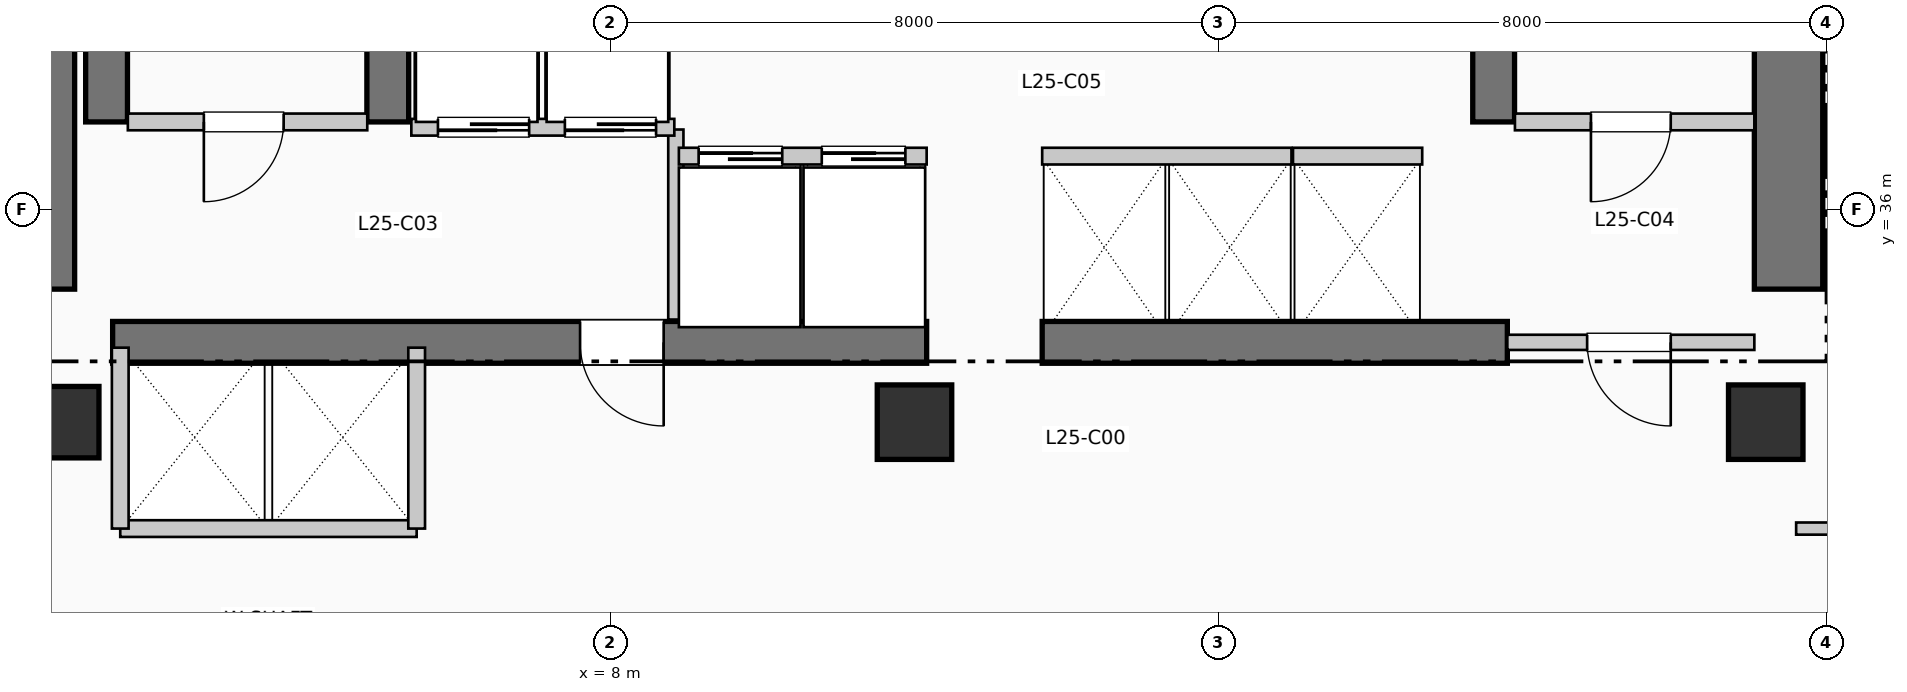
"""IFC4 building model, lengths in metres.
Left out: names, types, materials, properties, quantities, classifications, styles, units other than length and angle.
Written with IfcOpenShell. Run it as: python <this file> out.ifc"""

import sys

from ifc_helpers import new_model, si_unit, direction, frame, frame_2d, origin, origin_2d, place, context, subcontext, project, spatial, rectangle, extrude, element, fill, save


model = new_model("IFC4")
c1 = context("Model", 3, precision=1e-05, world=origin(), true_north=direction((0.0, 1.0)))
c2 = subcontext(c1, "Body", "Model", "MODEL_VIEW")
j1 = project(units=[si_unit("LENGTHUNIT", "METRE"), si_unit("PLANEANGLEUNIT", "RADIAN")], contexts=[c1])
p1 = place(None, origin())
s1 = spatial("IfcSite", under=j1, at=p1, CompositionType="ELEMENT")
p2 = place(p1, origin())
s2 = spatial("IfcBuilding", under=s1, at=p2, CompositionType="ELEMENT")
p3 = place(p2, frame((0.0, 0.0, 106.59)))
s3 = spatial("IfcBuildingStorey", under=s2, at=p3, CompositionType="ELEMENT", Elevation=106.59)
p4 = place(p3, frame((0.5, 34.95, 0.0), z_axis=(0.0, 0.0, 1.0), x_axis=(0.0, 1.0, 0.0)))
e1 = element("IfcWall", 1, at=p4, inside=s3, PredefinedType="SHEAR", context=c2, shape_type="SweptSolid", body=[
    extrude(rectangle(XDim=7.9, YDim=0.9, at=frame_2d((3.95, 0.0))), origin(), (0.0, 0.0, 1.0), 3.96),
])
p5 = place(p3, frame((23.5, 34.95, 0.0), z_axis=(0.0, 0.0, 1.0), x_axis=(0.0, 1.0, 0.0)))
e2 = element("IfcWall", 2, at=p5, inside=s3, PredefinedType="SHEAR", context=c2, shape_type="SweptSolid", body=[
    extrude(rectangle(XDim=10.64, YDim=0.9, at=frame_2d((5.32, 0.0))), origin(), (0.0, 0.0, 1.0), 3.96),
])
p6 = place(p3, frame((1.45, 34.25, 0.0), z_axis=(0.0, 0.0, 1.0), x_axis=(1.0, 0.0, 0.0)))
e3 = element("IfcWall", 3, at=p6, inside=s3, PredefinedType="SHEAR", context=c2, shape_type="SweptSolid", body=[
    extrude(rectangle(XDim=10.71, YDim=0.55, at=frame_2d((5.355, 0.0))), origin(), (0.0, 0.0, 1.0), 3.96),
])
p7 = place(p6, frame((7.25, 0.0, 0.0), z_axis=(0.0, 0.0, 1.0), x_axis=(-1.0, 0.0, 0.0)))
e4 = element("IfcOpeningElement", 4, at=p7, cuts=e3, PredefinedType="OPENING", context=c2, shape_type="SweptSolid", body=[
    extrude(rectangle(XDim=1.1, YDim=2.15, at=frame_2d((0.55, 1.075))), frame((0.0, 0.285, 0.0), z_axis=(0.0, -1.0, 0.0), x_axis=(1.0, 0.0, 0.0)), (0.0, 0.0, 1.0), 0.57),
])
p8 = place(p3, frame((13.68, 34.25, 0.0), z_axis=(0.0, 0.0, 1.0), x_axis=(1.0, 0.0, 0.0)))
e5 = element("IfcWall", 5, at=p8, inside=s3, PredefinedType="SHEAR", context=c2, shape_type="SweptSolid", body=[
    extrude(rectangle(XDim=6.12, YDim=0.55, at=frame_2d((3.06, 0.0))), origin(), (0.0, 0.0, 1.0), 3.96),
])
for number, where, z_axis, x_axis in (
    (6, (1.37, 37.15, 0.0), (0.0, 0.0, 1.0), (0.0, 1.0, 0.0)),
    (7, (5.07, 37.15, 0.0), (0.0, 0.0, 1.0), (0.0, 1.0, 0.0)),
    (8, (19.62, 37.15, 0.0), (0.0, 0.0, 1.0), (0.0, 1.0, 0.0)),
):
    element("IfcWall", number, at=place(p3, frame(where, z_axis=z_axis, x_axis=x_axis)), inside=s3, PredefinedType="SHEAR", context=c2, shape_type="SweptSolid", body=[
        extrude(rectangle(XDim=7.89, YDim=0.55, at=frame_2d((3.945, 0.0))), origin(), (0.0, 0.0, 1.0), 3.96),
    ])
p9 = place(p3, frame((0.8, 33.2, 0.0), z_axis=(0.0, 0.0, 1.0), x_axis=(1.0, 0.0, 0.0)))
e9 = element("IfcColumn", 9, at=p9, inside=s3, PredefinedType="COLUMN", context=c2, shape_type="SweptSolid", body=[
    extrude(rectangle(XDim=0.94, YDim=0.94, at=origin_2d()), origin(), (0.0, 0.0, 1.0), 3.96),
])
for number, where, z_axis, x_axis in (
    (10, (12.0, 33.2, 0.0), (0.0, 0.0, 1.0), (1.0, 0.0, 0.0)),
    (11, (23.2, 33.2, 0.0), (0.0, 0.0, 1.0), (1.0, 0.0, 0.0)),
):
    element("IfcColumn", number, at=place(p3, frame(where, z_axis=z_axis, x_axis=x_axis)), inside=s3, PredefinedType="COLUMN", context=c2, shape_type="SweptSolid", body=[
        extrude(rectangle(XDim=0.98, YDim=0.98, at=origin_2d()), origin(), (0.0, 0.0, 1.0), 3.96),
    ])
p10 = place(p3, frame((1.65, 37.15, 0.0), z_axis=(0.0, 0.0, 1.0), x_axis=(1.0, 0.0, 0.0)))
e12 = element("IfcWall", 12, at=p10, inside=s3, PredefinedType="PARTITIONING", context=c2, shape_type="SweptSolid", body=[
    extrude(rectangle(XDim=3.15, YDim=0.22, at=frame_2d((1.575, 0.0))), origin(), (0.0, 0.0, 1.0), 3.71),
])
p11 = place(p10, frame((2.05, 0.0, 0.0), z_axis=(0.0, 0.0, 1.0), x_axis=(-1.0, 0.0, 0.0)))
e13 = element("IfcOpeningElement", 13, at=p11, cuts=e12, PredefinedType="OPENING", context=c2, shape_type="SweptSolid", body=[
    extrude(rectangle(XDim=1.05, YDim=2.15, at=frame_2d((0.525, 1.075))), frame((0.0, 0.12, 0.0), z_axis=(0.0, -1.0, 0.0), x_axis=(1.0, 0.0, 0.0)), (0.0, 0.0, 1.0), 0.24),
])
p12 = place(p3, frame((8.86, 34.55, 0.0), z_axis=(0.0, 0.0, 1.0), x_axis=(0.0, 1.0, 0.0)))
e14 = element("IfcWall", 14, at=p12, inside=s3, PredefinedType="PARTITIONING", context=c2, shape_type="SweptSolid", body=[
    extrude(rectangle(XDim=2.5, YDim=0.2, at=frame_2d((1.25, 0.0))), origin(), (0.0, 0.0, 1.0), 3.71),
])
p13 = place(p3, frame((19.9, 37.15, 0.0), z_axis=(0.0, 0.0, 1.0), x_axis=(1.0, 0.0, 0.0)))
e15 = element("IfcWall", 15, at=p13, inside=s3, PredefinedType="PARTITIONING", context=c2, shape_type="SweptSolid", body=[
    extrude(rectangle(XDim=3.15, YDim=0.22, at=frame_2d((1.575, 0.0))), origin(), (0.0, 0.0, 1.0), 3.71),
])
p14 = place(p13, frame((2.05, 0.0, 0.0), z_axis=(0.0, 0.0, 1.0), x_axis=(-1.0, 0.0, 0.0)))
e16 = element("IfcOpeningElement", 16, at=p14, cuts=e15, PredefinedType="OPENING", context=c2, shape_type="SweptSolid", body=[
    extrude(rectangle(XDim=1.05, YDim=2.15, at=frame_2d((0.525, 1.075))), frame((0.0, 0.12, 0.0), z_axis=(0.0, -1.0, 0.0), x_axis=(1.0, 0.0, 0.0)), (0.0, 0.0, 1.0), 0.24),
])
p15 = place(p3, frame((19.8, 34.25, 0.0), z_axis=(0.0, 0.0, 1.0), x_axis=(1.0, 0.0, 0.0)))
e17 = element("IfcWall", 17, at=p15, inside=s3, PredefinedType="PARTITIONING", context=c2, shape_type="SweptSolid", body=[
    extrude(rectangle(XDim=3.25, YDim=0.2, at=frame_2d((1.625, 0.0))), origin(), (0.0, 0.0, 1.0), 3.71),
])
p16 = place(p15, frame((2.15, 0.0, 0.0), z_axis=(0.0, 0.0, 1.0), x_axis=(-1.0, 0.0, 0.0)))
e18 = element("IfcOpeningElement", 18, at=p16, cuts=e17, PredefinedType="OPENING", context=c2, shape_type="SweptSolid", body=[
    extrude(rectangle(XDim=1.1, YDim=2.15, at=frame_2d((0.55, 1.075))), frame((0.0, 0.11, 0.0), z_axis=(0.0, -1.0, 0.0), x_axis=(1.0, 0.0, 0.0)), (0.0, 0.0, 1.0), 0.22),
])
p17 = place(p3, frame((5.38, 37.08, 0.0), z_axis=(0.0, 0.0, 1.0), x_axis=(1.0, 0.0, 0.0)))
e19 = element("IfcWall", 19, at=p17, inside=s3, PredefinedType="PARTITIONING", context=c2, shape_type="SweptSolid", body=[
    extrude(rectangle(XDim=3.46, YDim=0.22, at=frame_2d((1.73, 0.0))), origin(), (0.0, 0.0, 1.0), 3.71),
])
p18 = place(p17, frame((1.55, 0.0, 0.0), z_axis=(0.0, 0.0, 1.0), x_axis=(-1.0, 0.0, 0.0)))
e20 = element("IfcOpeningElement", 20, at=p18, cuts=e19, PredefinedType="OPENING", context=c2, shape_type="SweptSolid", body=[
    extrude(rectangle(XDim=1.2, YDim=2.2, at=frame_2d((0.6, 1.1))), frame((0.0, 0.12, 0.0), z_axis=(0.0, -1.0, 0.0), x_axis=(1.0, 0.0, 0.0)), (0.0, 0.0, 1.0), 0.24),
])
p19 = place(p17, frame((3.22, 0.0, 0.0), z_axis=(0.0, 0.0, 1.0), x_axis=(-1.0, 0.0, 0.0)))
e21 = element("IfcOpeningElement", 21, at=p19, cuts=e19, PredefinedType="OPENING", context=c2, shape_type="SweptSolid", body=[
    extrude(rectangle(XDim=1.2, YDim=2.2, at=frame_2d((0.6, 1.1))), frame((0.0, 0.12, 0.0), z_axis=(0.0, -1.0, 0.0), x_axis=(1.0, 0.0, 0.0)), (0.0, 0.0, 1.0), 0.24),
])
p20 = place(p3, frame((1.55, 31.8, 0.0), z_axis=(0.0, 0.0, 1.0), x_axis=(1.0, 0.0, 0.0)))
e22 = element("IfcWall", 22, at=p20, inside=s3, PredefinedType="PARTITIONING", context=c2, shape_type="SweptSolid", body=[
    extrude(rectangle(XDim=3.9, YDim=0.22, at=frame_2d((1.95, 0.0))), origin(), (0.0, 0.0, 1.0), 3.71),
])
for number, where, z_axis, x_axis in (
    (23, (1.55, 31.8, 0.0), (0.0, 0.0, 1.0), (0.0, 1.0, 0.0)),
    (24, (5.45, 31.8, 0.0), (0.0, 0.0, 1.0), (0.0, 1.0, 0.0)),
):
    element("IfcWall", number, at=place(p3, frame(where, z_axis=z_axis, x_axis=x_axis)), inside=s3, PredefinedType="PARTITIONING", context=c2, shape_type="SweptSolid", body=[
        extrude(rectangle(XDim=2.38, YDim=0.22, at=frame_2d((1.19, 0.0))), origin(), (0.0, 0.0, 1.0), 3.71),
    ])
p21 = place(p3, frame((8.9, 36.7, 0.0), z_axis=(0.0, 0.0, 1.0), x_axis=(1.0, 0.0, 0.0)))
e25 = element("IfcWall", 25, at=p21, inside=s3, PredefinedType="PARTITIONING", context=c2, shape_type="SweptSolid", body=[
    extrude(rectangle(XDim=3.26, YDim=0.22, at=frame_2d((1.63, 0.0))), origin(), (0.0, 0.0, 1.0), 3.71),
])
p22 = place(p21, frame((0.26, 0.0, 0.0)))
e26 = element("IfcOpeningElement", 26, at=p22, cuts=e25, PredefinedType="OPENING", context=c2, shape_type="SweptSolid", body=[
    extrude(rectangle(XDim=1.1, YDim=2.2, at=frame_2d((0.55, 1.1))), frame((0.0, 0.12, 0.0), z_axis=(0.0, -1.0, 0.0), x_axis=(1.0, 0.0, 0.0)), (0.0, 0.0, 1.0), 0.24),
])
p23 = place(p21, frame((1.88, 0.0, 0.0)))
e27 = element("IfcOpeningElement", 27, at=p23, cuts=e25, PredefinedType="OPENING", context=c2, shape_type="SweptSolid", body=[
    extrude(rectangle(XDim=1.1, YDim=2.2, at=frame_2d((0.55, 1.1))), frame((0.0, 0.12, 0.0), z_axis=(0.0, -1.0, 0.0), x_axis=(1.0, 0.0, 0.0)), (0.0, 0.0, 1.0), 0.24),
])
p24 = place(p3, frame((13.68, 36.7, 0.0), z_axis=(0.0, 0.0, 1.0), x_axis=(1.0, 0.0, 0.0)))
e28 = element("IfcWall", 28, at=p24, inside=s3, PredefinedType="PARTITIONING", context=c2, shape_type="SweptSolid", body=[
    extrude(rectangle(XDim=3.28, YDim=0.22, at=frame_2d((1.64, 0.0))), origin(), (0.0, 0.0, 1.0), 3.71),
])
p25 = place(p3, frame((16.98, 36.7, 0.0), z_axis=(0.0, 0.0, 1.0), x_axis=(1.0, 0.0, 0.0)))
e29 = element("IfcWall", 29, at=p25, inside=s3, PredefinedType="PARTITIONING", context=c2, shape_type="SweptSolid", body=[
    extrude(rectangle(XDim=1.7, YDim=0.22, at=frame_2d((0.85, 0.0))), origin(), (0.0, 0.0, 1.0), 3.71),
])
p26 = place(p3, frame((23.6, 31.8, 0.0), z_axis=(0.0, 0.0, 1.0), x_axis=(1.0, 0.0, 0.0)))
e30 = element("IfcWall", 30, at=p26, inside=s3, PredefinedType="PARTITIONING", context=c2, shape_type="SweptSolid", body=[
    extrude(rectangle(XDim=32.21, YDim=0.16, at=frame_2d((16.105, 0.0))), origin(), (0.0, 0.0, 1.0), 3.71),
])
p27 = place(p26, frame((8.255, 0.0, 0.0)))
e31 = element("IfcOpeningElement", 31, at=p27, cuts=e30, PredefinedType="OPENING", context=c2, shape_type="SweptSolid", body=[
    extrude(rectangle(XDim=0.95, YDim=2.15, at=frame_2d((0.475, 1.075))), frame((0.0, 0.09, 0.0), z_axis=(0.0, -1.0, 0.0), x_axis=(1.0, 0.0, 0.0)), (0.0, 0.0, 1.0), 0.18),
])
p28 = place(p26, frame((23.36, 0.0, 0.0)))
e32 = element("IfcOpeningElement", 32, at=p28, cuts=e30, PredefinedType="OPENING", context=c2, shape_type="SweptSolid", body=[
    extrude(rectangle(XDim=0.95, YDim=2.15, at=frame_2d((0.475, 1.075))), frame((0.0, 0.09, 0.0), z_axis=(0.0, -1.0, 0.0), x_axis=(1.0, 0.0, 0.0)), (0.0, 0.0, 1.0), 0.18),
])
p29 = place(p11, origin())
e33 = element("IfcDoor", 33, at=p29, inside=s3, OperationType="SINGLE_SWING_LEFT", PredefinedType="DOOR", context=c2, shape_type="SweptSolid", body=[
    extrude(rectangle(XDim=1.05, YDim=2.15, at=frame_2d((0.525, 1.075))), frame((0.0, 0.025, 0.0), z_axis=(0.0, -1.0, 0.0), x_axis=(1.0, 0.0, 0.0)), (0.0, 0.0, 1.0), 0.05),
])
fill(e13, e33)
p30 = place(p7, origin())
e34 = element("IfcDoor", 34, at=p30, inside=s3, OperationType="SINGLE_SWING_RIGHT", PredefinedType="DOOR", context=c2, shape_type="SweptSolid", body=[
    extrude(rectangle(XDim=1.1, YDim=2.15, at=frame_2d((0.55, 1.075))), frame((0.0, 0.025, 0.0), z_axis=(0.0, -1.0, 0.0), x_axis=(1.0, 0.0, 0.0)), (0.0, 0.0, 1.0), 0.05),
])
fill(e4, e34)
p31 = place(p14, origin())
e35 = element("IfcDoor", 35, at=p31, inside=s3, OperationType="SINGLE_SWING_LEFT", PredefinedType="DOOR", context=c2, shape_type="SweptSolid", body=[
    extrude(rectangle(XDim=1.05, YDim=2.15, at=frame_2d((0.525, 1.075))), frame((0.0, 0.025, 0.0), z_axis=(0.0, -1.0, 0.0), x_axis=(1.0, 0.0, 0.0)), (0.0, 0.0, 1.0), 0.05),
])
fill(e16, e35)
p32 = place(p16, origin())
e36 = element("IfcDoor", 36, at=p32, inside=s3, OperationType="SINGLE_SWING_RIGHT", PredefinedType="DOOR", context=c2, shape_type="SweptSolid", body=[
    extrude(rectangle(XDim=1.1, YDim=2.15, at=frame_2d((0.55, 1.075))), frame((0.0, 0.025, 0.0), z_axis=(0.0, -1.0, 0.0), x_axis=(1.0, 0.0, 0.0)), (0.0, 0.0, 1.0), 0.05),
])
fill(e18, e36)
p33 = place(p18, origin())
e37 = element("IfcDoor", 37, at=p33, inside=s3, OperationType="SLIDING_TO_RIGHT", PredefinedType="DOOR", context=c2, shape_type="SweptSolid", body=[
    extrude(rectangle(XDim=1.2, YDim=2.2, at=frame_2d((0.6, 1.1))), frame((0.0, 0.025, 0.0), z_axis=(0.0, -1.0, 0.0), x_axis=(1.0, 0.0, 0.0)), (0.0, 0.0, 1.0), 0.05),
])
fill(e20, e37)
p34 = place(p19, origin())
e38 = element("IfcDoor", 38, at=p34, inside=s3, OperationType="SLIDING_TO_RIGHT", PredefinedType="DOOR", context=c2, shape_type="SweptSolid", body=[
    extrude(rectangle(XDim=1.2, YDim=2.2, at=frame_2d((0.6, 1.1))), frame((0.0, 0.025, 0.0), z_axis=(0.0, -1.0, 0.0), x_axis=(1.0, 0.0, 0.0)), (0.0, 0.0, 1.0), 0.05),
])
fill(e21, e38)
p35 = place(p22, origin())
e39 = element("IfcDoor", 39, at=p35, inside=s3, OperationType="SLIDING_TO_LEFT", PredefinedType="DOOR", context=c2, shape_type="SweptSolid", body=[
    extrude(rectangle(XDim=1.1, YDim=2.2, at=frame_2d((0.55, 1.1))), frame((0.0, 0.025, 0.0), z_axis=(0.0, -1.0, 0.0), x_axis=(1.0, 0.0, 0.0)), (0.0, 0.0, 1.0), 0.05),
])
fill(e26, e39)
p36 = place(p23, origin())
e40 = element("IfcDoor", 40, at=p36, inside=s3, OperationType="SLIDING_TO_LEFT", PredefinedType="DOOR", context=c2, shape_type="SweptSolid", body=[
    extrude(rectangle(XDim=1.1, YDim=2.2, at=frame_2d((0.55, 1.1))), frame((0.0, 0.025, 0.0), z_axis=(0.0, -1.0, 0.0), x_axis=(1.0, 0.0, 0.0)), (0.0, 0.0, 1.0), 0.05),
])
fill(e27, e40)
save(model, sys.argv[1])
